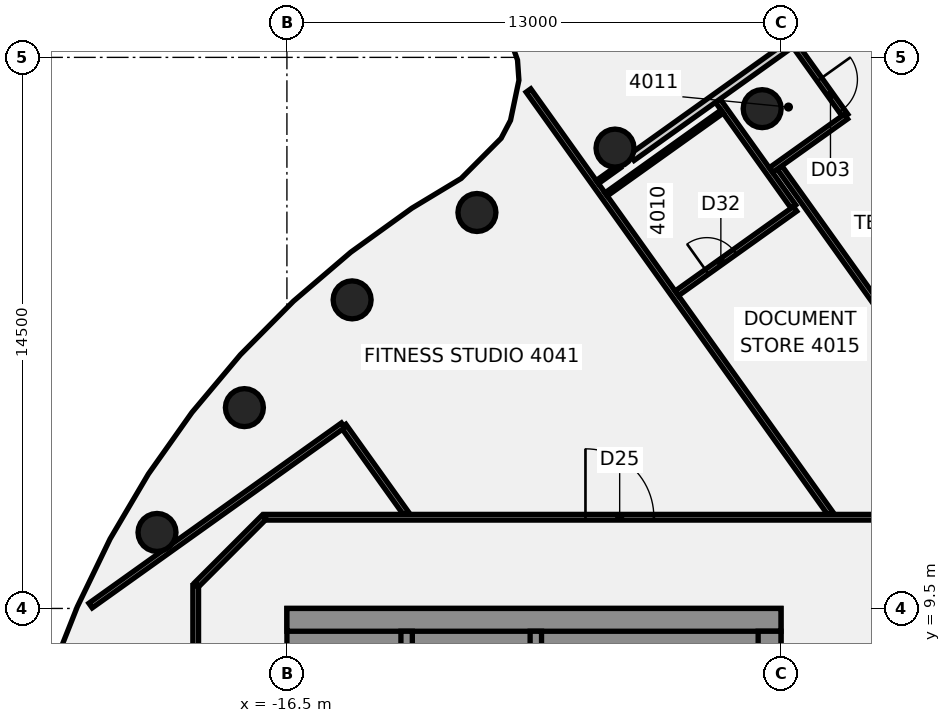
"""IFC4 building model, lengths in metres.
Left out: names, types, materials, properties, quantities, classifications, styles, units other than length and angle.
Written with IfcOpenShell. Run it as: python <this file> out.ifc"""

import sys

from ifc_helpers import new_model, si_unit, direction, frame, frame_2d, origin, origin_2d, place, context, subcontext, project, spatial, polyline, rectangle, circle, outline, extrude, element, fill, save


model = new_model("IFC4")
c1 = context("Model", 3, precision=1e-05, world=origin(), true_north=direction((0.0, 1.0)))
c2 = subcontext(c1, "Body", "Model", "MODEL_VIEW")
j1 = project(units=[si_unit("LENGTHUNIT", "METRE"), si_unit("PLANEANGLEUNIT", "RADIAN")], contexts=[c1])
p1 = place(None, origin())
s1 = spatial("IfcSite", under=j1, at=p1, CompositionType="ELEMENT")
p2 = place(p1, origin())
s2 = spatial("IfcBuilding", under=s1, at=p2, CompositionType="ELEMENT")
p3 = place(p2, frame((0.0, 0.0, 163.0)))
s3 = spatial("IfcBuildingStorey", under=s2, at=p3, CompositionType="ELEMENT", Elevation=163.0)
for number, where, z_axis, x_axis in (
    (1, (-3.994, 22.651, -0.14), (0.0, 0.0, 1.0), (1.0, 0.0, 0.0)),
    (2, (-7.866, 21.613, -0.14), (0.0, 0.0, 1.0), (1.0, 0.0, 0.0)),
    (3, (-11.5, 19.919, -0.14), (0.0, 0.0, 1.0), (1.0, 0.0, 0.0)),
    (4, (-14.784, 17.619, -0.14), (0.0, 0.0, 1.0), (1.0, 0.0, 0.0)),
    (5, (-17.619, 14.784, -0.14), (0.0, 0.0, 1.0), (1.0, 0.0, 0.0)),
    (6, (-19.919, 11.5, -0.14), (0.0, 0.0, 1.0), (1.0, 0.0, 0.0)),
):
    element("IfcColumn", number, at=place(p3, frame(where, z_axis=z_axis, x_axis=x_axis)), inside=s3, PredefinedType="COLUMN", context=c2, shape_type="SweptSolid", body=[
        extrude(circle(Radius=0.5, at=origin_2d()), origin(), (0.0, 0.0, 1.0), 3.75),
    ])
p4 = place(p3, frame((-15.01, 14.304, 0.0), z_axis=(0.0, 0.0, 1.0), x_axis=(0.581123885817, -0.813815107585, 0.0)))
e7 = element("IfcWall", 7, at=p4, inside=s3, PredefinedType="PARTITIONING", context=c2, shape_type="SweptSolid", body=[
    extrude(rectangle(XDim=2.829, YDim=0.15, at=frame_2d((1.414, 0.0))), origin(), (0.0, 0.0, 1.0), 3.01),
])
p5 = place(p3, frame((-10.982, 35.318, 0.0), z_axis=(0.0, 0.0, 1.0), x_axis=(0.581048167979, -0.813869170376, 0.0)))
e8 = element("IfcWall", 8, at=p5, inside=s3, PredefinedType="PARTITIONING", context=c2, shape_type="SweptSolid", body=[
    extrude(rectangle(XDim=15.801, YDim=0.15, at=frame_2d((7.9, 0.0))), origin(), (0.0, 0.0, 1.0), 3.01),
])
p6 = place(p5, frame((14.621, 0.0, 0.0)))
e9 = element("IfcOpeningElement", 9, at=p6, cuts=e8, PredefinedType="OPENING", context=c2, shape_type="SweptSolid", body=[
    extrude(rectangle(XDim=1.0, YDim=2.1, at=frame_2d((0.5, 1.05))), frame((0.0, 0.085, 0.0), z_axis=(0.0, -1.0, 0.0), x_axis=(1.0, 0.0, 0.0)), (0.0, 0.0, 1.0), 0.17),
])
p7 = place(p5, frame((4.42, 0.0, 0.0)))
e10 = element("IfcOpeningElement", 10, at=p7, cuts=e8, PredefinedType="OPENING", context=c2, shape_type="SweptSolid", body=[
    extrude(rectangle(XDim=0.9, YDim=2.1, at=frame_2d((0.45, 1.05))), frame((0.0, 0.085, 0.0), z_axis=(0.0, -1.0, 0.0), x_axis=(1.0, 0.0, 0.0)), (0.0, 0.0, 1.0), 0.17),
])
p8 = place(p3, frame((-10.144, 23.129, 0.0), z_axis=(0.0, 0.0, 1.0), x_axis=(0.581021948815, -0.813887888468, 0.0)))
e11 = element("IfcWall", 11, at=p8, inside=s3, PredefinedType="PARTITIONING", context=c2, shape_type="SweptSolid", body=[
    extrude(rectangle(XDim=13.671, YDim=0.15, at=frame_2d((6.836, 0.0))), origin(), (0.0, 0.0, 1.0), 3.01),
])
p9 = place(p3, frame((-5.161, 22.861, 0.0), z_axis=(0.0, 0.0, 1.0), x_axis=(0.581002146179, -0.813902024899, 0.0)))
e12 = element("IfcWall", 12, at=p9, inside=s3, PredefinedType="PARTITIONING", context=c2, shape_type="SweptSolid", body=[
    extrude(rectangle(XDim=3.425, YDim=0.15, at=frame_2d((1.712, 0.0))), origin(), (0.0, 0.0, 1.0), 3.01),
])
p10 = place(p3, frame((-3.534, 21.099, 0.0), z_axis=(0.0, 0.0, 1.0), x_axis=(0.58105429552, -0.813864795687, 0.0)))
e13 = element("IfcWall", 13, at=p10, inside=s3, PredefinedType="PARTITIONING", context=c2, shape_type="SweptSolid", body=[
    extrude(rectangle(XDim=11.178, YDim=0.15, at=frame_2d((5.589, 0.0))), origin(), (0.0, 0.0, 1.0), 3.01),
])
p11 = place(p10, frame((6.67, 0.0, 0.0)))
e14 = element("IfcOpeningElement", 14, at=p11, cuts=e13, PredefinedType="OPENING", context=c2, shape_type="SweptSolid", body=[
    extrude(rectangle(XDim=0.9, YDim=2.1, at=frame_2d((0.45, 1.05))), frame((0.0, 0.085, 0.0), z_axis=(0.0, -1.0, 0.0), x_axis=(1.0, 0.0, 0.0)), (0.0, 0.0, 1.0), 0.17),
])
p12 = place(p3, frame((-17.065, 11.9, 0.0), z_axis=(0.0, 0.0, 1.0), x_axis=(1.0, 0.0, 0.0)))
e15 = element("IfcWall", 15, at=p12, inside=s3, PredefinedType="PARTITIONING", context=c2, shape_type="SweptSolid", body=[
    extrude(rectangle(XDim=34.165, YDim=0.15, at=frame_2d((17.083, 0.0))), origin(), (0.0, 0.0, 1.0), 3.01),
])
p13 = place(p12, frame((22.648, 0.0, 0.0)))
e16 = element("IfcOpeningElement", 16, at=p13, cuts=e15, PredefinedType="OPENING", context=c2, shape_type="SweptSolid", body=[
    extrude(rectangle(XDim=1.8, YDim=2.1, at=frame_2d((0.9, 1.05))), frame((0.0, 0.085, 0.0), z_axis=(0.0, -1.0, 0.0), x_axis=(1.0, 0.0, 0.0)), (0.0, 0.0, 1.0), 0.17),
])
p14 = place(p12, frame((28.812, 0.0, 0.0)))
e17 = element("IfcOpeningElement", 17, at=p14, cuts=e15, PredefinedType="OPENING", context=c2, shape_type="SweptSolid", body=[
    extrude(rectangle(XDim=1.8, YDim=2.1, at=frame_2d((0.9, 1.05))), frame((0.0, 0.085, 0.0), z_axis=(0.0, -1.0, 0.0), x_axis=(1.0, 0.0, 0.0)), (0.0, 0.0, 1.0), 0.17),
])
p15 = place(p12, frame((8.421, 0.0, 0.0)))
e18 = element("IfcOpeningElement", 18, at=p15, cuts=e15, PredefinedType="OPENING", context=c2, shape_type="SweptSolid", body=[
    extrude(rectangle(XDim=1.8, YDim=2.1, at=frame_2d((0.9, 1.05))), frame((0.0, 0.085, 0.0), z_axis=(0.0, -1.0, 0.0), x_axis=(1.0, 0.0, 0.0)), (0.0, 0.0, 1.0), 0.17),
])
p16 = place(p3, frame((-3.76, 21.036, 0.0), z_axis=(0.0, 0.0, 1.0), x_axis=(0.814210336766, 0.580570002241, 0.0)))
e19 = element("IfcWall", 19, at=p16, inside=s3, PredefinedType="PARTITIONING", context=c2, shape_type="SweptSolid", body=[
    extrude(rectangle(XDim=2.42, YDim=0.15, at=frame_2d((1.21, 0.0))), origin(), (0.0, 0.0, 1.0), 3.01),
])
p17 = place(p3, frame((-21.667, 9.575, 0.0), z_axis=(0.0, 0.0, 1.0), x_axis=(0.813848610714, 0.581076964643, 0.0)))
e20 = element("IfcWall", 20, at=p17, inside=s3, PredefinedType="PARTITIONING", context=c2, shape_type="SweptSolid", body=[
    extrude(rectangle(XDim=8.165, YDim=0.15, at=frame_2d((4.083, 0.0))), origin(), (0.0, 0.0, 1.0), 3.01),
])
p18 = place(p3, frame((-8.1, 20.395, 0.0), z_axis=(0.0, 0.0, 1.0), x_axis=(0.813865417851, 0.581053424072, 0.0)))
e21 = element("IfcWall", 21, at=p18, inside=s3, PredefinedType="PARTITIONING", context=c2, shape_type="SweptSolid", body=[
    extrude(rectangle(XDim=3.75, YDim=0.1, at=frame_2d((1.875, 0.0))), origin(), (0.0, 0.0, 1.0), 3.01),
])
p19 = place(p3, frame((-6.237, 17.793, 0.0), z_axis=(0.0, 0.0, 1.0), x_axis=(0.813875956833, 0.58103866213, 0.0)))
e22 = element("IfcWall", 22, at=p19, inside=s3, PredefinedType="PARTITIONING", context=c2, shape_type="SweptSolid", body=[
    extrude(rectangle(XDim=3.82, YDim=0.15, at=frame_2d((1.91, 0.0))), origin(), (0.0, 0.0, 1.0), 3.01),
])
p20 = place(p19, frame((0.97, 0.0, 0.0)))
e23 = element("IfcOpeningElement", 23, at=p20, cuts=e22, PredefinedType="OPENING", context=c2, shape_type="SweptSolid", body=[
    extrude(rectangle(XDim=0.9, YDim=2.1, at=frame_2d((0.45, 1.05))), frame((0.0, 0.085, 0.0), z_axis=(0.0, -1.0, 0.0), x_axis=(1.0, 0.0, 0.0)), (0.0, 0.0, 1.0), 0.17),
])
p21 = place(p3, frame((-8.331, 20.72, 0.0), z_axis=(0.0, 0.0, 1.0), x_axis=(0.813733471207, 0.581238193719, 0.0)))
e24 = element("IfcWall", 24, at=p21, inside=s3, PredefinedType="PARTITIONING", context=c2, shape_type="SweptSolid", body=[
    extrude(rectangle(XDim=0.712, YDim=0.1, at=frame_2d((0.356, 0.0))), origin(), (0.0, 0.0, 1.0), 3.01),
])
p22 = place(p3, frame((-7.422, 21.369, 0.0), z_axis=(0.0, 0.0, 1.0), x_axis=(0.813698226371, 0.581287533326, 0.0)))
e25 = element("IfcWall", 25, at=p22, inside=s3, PredefinedType="PARTITIONING", context=c2, shape_type="SweptSolid", body=[
    extrude(rectangle(XDim=13.106, YDim=0.2, at=frame_2d((6.553, 0.0))), origin(), (0.0, 0.0, 1.0), 3.01),
])
p23 = place(p22, frame((5.507, 0.0, 0.0)))
e26 = element("IfcOpeningElement", 26, at=p23, cuts=e25, PredefinedType="OPENING", context=c2, shape_type="SweptSolid", body=[
    extrude(rectangle(XDim=1.4, YDim=2.1, at=frame_2d((0.7, 1.05))), frame((0.0, 0.11, 0.0), z_axis=(0.0, -1.0, 0.0), x_axis=(1.0, 0.0, 0.0)), (0.0, 0.0, 1.0), 0.22),
])
p24 = place(p3, frame((-18.872, 10.128, 0.0), z_axis=(0.0, 0.0, 1.0), x_axis=(0.707106781187, 0.707106781187, 0.0)))
e27 = element("IfcWall", 27, at=p24, inside=s3, PredefinedType="PARTITIONING", context=c2, shape_type="SweptSolid", body=[
    extrude(rectangle(XDim=2.505, YDim=0.15, at=frame_2d((1.253, 0.0))), origin(), (0.0, 0.0, 1.0), 3.01),
])
p25 = place(p3, frame((-18.9, -10.1, 0.0), z_axis=(0.0, 0.0, 1.0), x_axis=(0.0, 1.0, 0.0)))
e28 = element("IfcWall", 28, at=p25, inside=s3, PredefinedType="PARTITIONING", context=c2, shape_type="SweptSolid", body=[
    extrude(rectangle(XDim=20.2, YDim=0.15, at=frame_2d((10.1, 0.0))), origin(), (0.0, 0.0, 1.0), 3.01),
])
p26 = place(p25, frame((12.336, 0.0, 0.0)))
e29 = element("IfcOpeningElement", 29, at=p26, cuts=e28, PredefinedType="OPENING", context=c2, shape_type="SweptSolid", body=[
    extrude(rectangle(XDim=1.8, YDim=2.1, at=frame_2d((0.9, 1.05))), frame((0.0, 0.085, 0.0), z_axis=(0.0, -1.0, 0.0), x_axis=(1.0, 0.0, 0.0)), (0.0, 0.0, 1.0), 0.17),
])
p27 = place(p3, origin())
e30 = element("IfcWall", 30, at=p27, inside=s3, PredefinedType="SHEAR", context=c2, shape_type="SweptSolid", body=[
    extrude(outline(polyline([(-13.5, -8.125), (-15.9, -8.125), (-15.9, -5.625), (-13.5, -5.625), (-13.5, -5.375), (-15.9, -5.375), (-15.9, 5.375), (-13.5, 5.375), (-13.5, 5.625), (-15.9, 5.625), (-15.9, 8.125), (-13.5, 8.125), (-13.5, 8.9), (-15.9, 8.9), (-16.5, 8.9), (-16.5, -8.9), (-15.9, -8.9), (-13.5, -8.9), (-13.5, -8.125)])), origin(), (0.0, 0.0, 1.0), 3.61),
])
p28 = place(p3, frame((-16.5, 9.2, 0.0), z_axis=(0.0, 0.0, 1.0), x_axis=(1.0, 0.0, 0.0)))
e31 = element("IfcWall", 31, at=p28, inside=s3, PredefinedType="SHEAR", context=c2, shape_type="SweptSolid", body=[
    extrude(rectangle(XDim=13.0, YDim=0.6, at=frame_2d((6.5, 0.0))), origin(), (0.0, 0.0, 1.0), 3.61),
])
p29 = place(p3, origin())
e32 = element("IfcWall", 32, at=p29, inside=s3, PredefinedType="SHEAR", context=c2, shape_type="SweptSolid", body=[
    extrude(outline(polyline([(-9.8, -5.375), (-9.8, -5.625), (-7.5, -5.625), (-7.2, -5.625), (-7.2, 8.9), (-7.5, 8.9), (-9.8, 8.9), (-9.8, 8.125), (-7.5, 8.125), (-7.5, 5.625), (-9.8, 5.625), (-9.8, 5.375), (-7.5, 5.375), (-7.5, 2.875), (-9.8, 2.875), (-9.8, 2.625), (-7.5, 2.625), (-7.5, 0.125), (-9.8, 0.125), (-9.8, -0.125), (-7.5, -0.125), (-7.5, -2.625), (-9.8, -2.625), (-9.8, -2.875), (-7.5, -2.875), (-7.5, -5.375), (-9.8, -5.375)])), origin(), (0.0, 0.0, 1.0), 3.61),
])
p30 = place(p3, frame((-13.35, -8.9, 0.0), z_axis=(0.0, 0.0, 1.0), x_axis=(0.0, 1.0, 0.0)))
e33 = element("IfcWall", 33, at=p30, inside=s3, PredefinedType="SHEAR", context=c2, shape_type="SweptSolid", body=[
    extrude(rectangle(XDim=17.8, YDim=0.3, at=frame_2d((8.9, 0.0))), origin(), (0.0, 0.0, 1.0), 3.61),
])
p31 = place(p30, frame((1.325, 0.0, 0.0)))
e34 = element("IfcOpeningElement", 34, at=p31, cuts=e33, PredefinedType="OPENING", context=c2, shape_type="SweptSolid", body=[
    extrude(rectangle(XDim=1.4, YDim=2.1, at=frame_2d((0.7, 1.05))), frame((0.0, 0.16, 0.0), z_axis=(0.0, -1.0, 0.0), x_axis=(1.0, 0.0, 0.0)), (0.0, 0.0, 1.0), 0.32),
])
p32 = place(p30, frame((8.4, 0.0, 0.0)))
e35 = element("IfcOpeningElement", 35, at=p32, cuts=e33, PredefinedType="OPENING", context=c2, shape_type="SweptSolid", body=[
    extrude(rectangle(XDim=1.0, YDim=2.1, at=frame_2d((0.5, 1.05))), frame((0.0, 0.16, 0.0), z_axis=(0.0, -1.0, 0.0), x_axis=(1.0, 0.0, 0.0)), (0.0, 0.0, 1.0), 0.32),
])
p33 = place(p3, frame((-9.95, -8.9, 0.0), z_axis=(0.0, 0.0, 1.0), x_axis=(0.0, 1.0, 0.0)))
e36 = element("IfcWall", 36, at=p33, inside=s3, PredefinedType="SHEAR", context=c2, shape_type="SweptSolid", body=[
    extrude(rectangle(XDim=17.8, YDim=0.3, at=frame_2d((8.9, 0.0))), origin(), (0.0, 0.0, 1.0), 3.61),
])
p34 = place(p33, frame((4.175, 0.0, 0.0)))
e37 = element("IfcOpeningElement", 37, at=p34, cuts=e36, PredefinedType="OPENING", context=c2, shape_type="SweptSolid", body=[
    extrude(rectangle(XDim=1.2, YDim=2.1, at=frame_2d((0.6, 1.05))), frame((0.0, 0.16, 0.0), z_axis=(0.0, -1.0, 0.0), x_axis=(1.0, 0.0, 0.0)), (0.0, 0.0, 1.0), 0.32),
])
p35 = place(p33, frame((6.925, 0.0, 0.0)))
e38 = element("IfcOpeningElement", 38, at=p35, cuts=e36, PredefinedType="OPENING", context=c2, shape_type="SweptSolid", body=[
    extrude(rectangle(XDim=1.2, YDim=2.1, at=frame_2d((0.6, 1.05))), frame((0.0, 0.16, 0.0), z_axis=(0.0, -1.0, 0.0), x_axis=(1.0, 0.0, 0.0)), (0.0, 0.0, 1.0), 0.32),
])
p36 = place(p3, frame((-3.8, -8.9, 0.0), z_axis=(0.0, 0.0, 1.0), x_axis=(0.0, 1.0, 0.0)))
e39 = element("IfcWall", 39, at=p36, inside=s3, PredefinedType="SHEAR", context=c2, shape_type="SweptSolid", body=[
    extrude(rectangle(XDim=17.8, YDim=0.6, at=frame_2d((8.9, 0.0))), origin(), (0.0, 0.0, 1.0), 3.61),
])
p37 = place(p36, frame((1.25, 0.0, 0.0)))
e40 = element("IfcOpeningElement", 40, at=p37, cuts=e39, PredefinedType="OPENING", context=c2, shape_type="SweptSolid", body=[
    extrude(rectangle(XDim=1.8, YDim=2.1, at=frame_2d((0.9, 1.05))), frame((0.0, 0.31, 0.0), z_axis=(0.0, -1.0, 0.0), x_axis=(1.0, 0.0, 0.0)), (0.0, 0.0, 1.0), 0.62),
])
p38 = place(p36, frame((12.377, 0.0, 0.0)))
e41 = element("IfcOpeningElement", 41, at=p38, cuts=e39, PredefinedType="OPENING", context=c2, shape_type="SweptSolid", body=[
    extrude(rectangle(XDim=1.0, YDim=2.1, at=frame_2d((0.5, 1.05))), frame((0.0, 0.31, 0.0), z_axis=(0.0, -1.0, 0.0), x_axis=(1.0, 0.0, 0.0)), (0.0, 0.0, 1.0), 0.62),
])
p39 = place(p36, frame((15.903, 0.0, 0.0)))
e42 = element("IfcOpeningElement", 42, at=p39, cuts=e39, PredefinedType="OPENING", context=c2, shape_type="SweptSolid", body=[
    extrude(rectangle(XDim=1.0, YDim=2.1, at=frame_2d((0.5, 1.05))), frame((0.0, 0.31, 0.0), z_axis=(0.0, -1.0, 0.0), x_axis=(1.0, 0.0, 0.0)), (0.0, 0.0, 1.0), 0.62),
])
p40 = place(p6, frame((1.0, 0.0, 0.0), z_axis=(0.0, 0.0, 1.0), x_axis=(-1.0, 0.0, 0.0)))
e43 = element("IfcDoor", 43, at=p40, inside=s3, OperationType="SINGLE_SWING_RIGHT", PredefinedType="DOOR", context=c2, shape_type="SweptSolid", body=[
    extrude(rectangle(XDim=1.0, YDim=2.1, at=frame_2d((0.5, 1.05))), frame((0.0, 0.025, 0.0), z_axis=(0.0, -1.0, 0.0), x_axis=(1.0, 0.0, 0.0)), (0.0, 0.0, 1.0), 0.05),
])
fill(e9, e43)
p41 = place(p15, origin())
e44 = element("IfcDoor", 44, at=p41, inside=s3, OperationType="DOUBLE_DOOR_SINGLE_SWING", PredefinedType="DOOR", context=c2, shape_type="SweptSolid", body=[
    extrude(rectangle(XDim=1.8, YDim=2.1, at=frame_2d((0.9, 1.05))), frame((0.0, 0.025, 0.0), z_axis=(0.0, -1.0, 0.0), x_axis=(1.0, 0.0, 0.0)), (0.0, 0.0, 1.0), 0.05),
])
fill(e18, e44)
p42 = place(p20, origin())
e45 = element("IfcDoor", 45, at=p42, inside=s3, OperationType="SINGLE_SWING_RIGHT", PredefinedType="DOOR", context=c2, shape_type="SweptSolid", body=[
    extrude(rectangle(XDim=0.9, YDim=2.1, at=frame_2d((0.45, 1.05))), frame((0.0, 0.025, 0.0), z_axis=(0.0, -1.0, 0.0), x_axis=(1.0, 0.0, 0.0)), (0.0, 0.0, 1.0), 0.05),
])
fill(e23, e45)
save(model, sys.argv[1])
